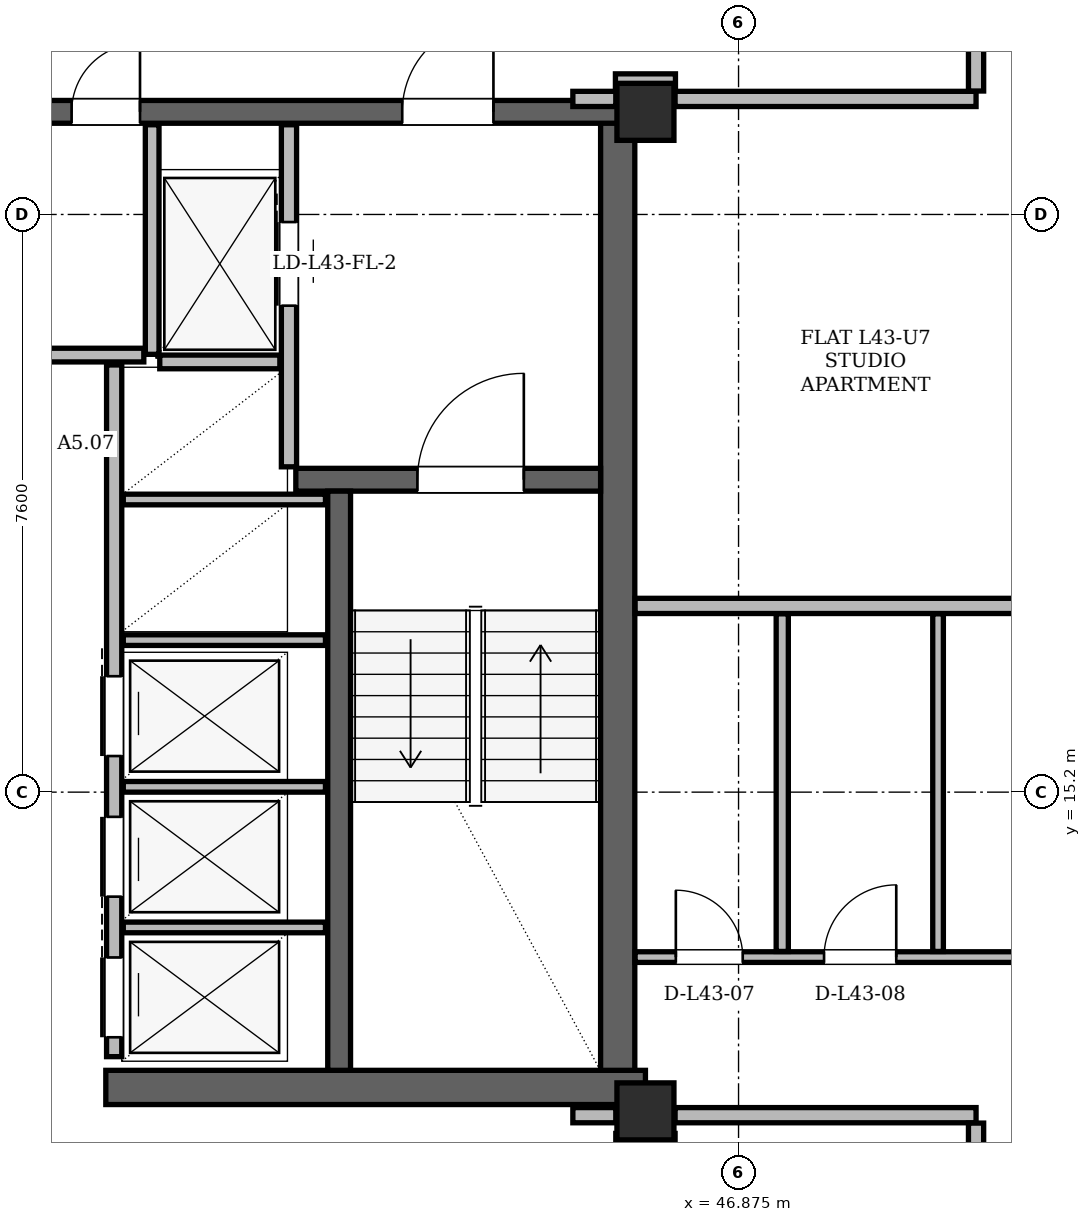
"""IFC4 building model, lengths in metres.
Left out: names, types, materials, properties, quantities, classifications, styles, units other than length and angle.
Written with IfcOpenShell. Run it as: python <this file> out.ifc"""

import sys

from ifc_helpers import new_model, si_unit, direction, frame, frame_2d, origin, origin_2d, place, context, subcontext, project, spatial, rectangle, hollow_rectangle, extrude, element, fill, save


model = new_model("IFC4")
c1 = context("Model", 3, precision=1e-05, world=origin(), true_north=direction((0.0, 1.0)))
c2 = subcontext(c1, "Body", "Model", "MODEL_VIEW")
j1 = project(units=[si_unit("LENGTHUNIT", "METRE"), si_unit("PLANEANGLEUNIT", "RADIAN")], contexts=[c1])
p1 = place(None, origin())
s1 = spatial("IfcSite", under=j1, at=p1, CompositionType="ELEMENT")
p2 = place(p1, origin())
s2 = spatial("IfcBuilding", under=s1, at=p2, CompositionType="ELEMENT")
p3 = place(p2, frame((0.0, 0.0, 163.8)))
s3 = spatial("IfcBuildingStorey", under=s2, at=p3, CompositionType="ELEMENT", Elevation=163.8)
for number, where, z_axis, x_axis in (
    (1, (45.65, 11.0, 0.0), (0.0, 0.0, 1.0), (1.0, 0.0, 0.0)),
    (2, (45.65, 24.15, 0.0), (0.0, 0.0, 1.0), (1.0, 0.0, 0.0)),
):
    element("IfcColumn", number, at=place(p3, frame(where, z_axis=z_axis, x_axis=x_axis)), inside=s3, PredefinedType="COLUMN", context=c2, shape_type="SweptSolid", body=[
        extrude(hollow_rectangle(XDim=0.75, YDim=0.75, WallThickness=0.06, at=origin_2d()), origin(), (0.0, 0.0, 1.0), 3.6),
    ])
p4 = place(p3, frame((45.285, 11.0, 0.0), z_axis=(0.0, 0.0, 1.0), x_axis=(0.0, 1.0, 0.0)))
e3 = element("IfcWall", 3, at=p4, inside=s3, PredefinedType="SHEAR", context=c2, shape_type="SweptSolid", body=[
    extrude(rectangle(XDim=13.3, YDim=0.45, at=frame_2d((6.65, 0.0))), origin(), (0.0, 0.0, 1.0), 3.38),
])
p5 = place(p3, frame((38.55, 11.315, 0.0), z_axis=(0.0, 0.0, 1.0), x_axis=(1.0, 0.0, 0.0)))
e4 = element("IfcWall", 4, at=p5, inside=s3, PredefinedType="SHEAR", context=c2, shape_type="SweptSolid", body=[
    extrude(rectangle(XDim=7.1, YDim=0.45, at=frame_2d((3.55, 0.0))), origin(), (0.0, 0.0, 1.0), 3.38),
])
p6 = place(p3, frame((29.65, 24.15, 0.0), z_axis=(0.0, 0.0, 1.0), x_axis=(1.0, 0.0, 0.0)))
e5 = element("IfcWall", 5, at=p6, inside=s3, PredefinedType="SHEAR", context=c2, shape_type="SweptSolid", body=[
    extrude(rectangle(XDim=15.7, YDim=0.3, at=frame_2d((7.85, 0.0))), origin(), (0.0, 0.0, 1.0), 3.38),
])
p7 = place(p6, frame((1.7, 0.0, 0.0)))
e6 = element("IfcOpeningElement", 6, at=p7, cuts=e5, PredefinedType="OPENING", context=c2, shape_type="SweptSolid", body=[
    extrude(rectangle(XDim=1.2, YDim=2.2, at=frame_2d((0.6, 1.1))), frame((0.0, 0.15, 0.0), z_axis=(0.0, -1.0, 0.0), x_axis=(1.0, 0.0, 0.0)), (0.0, 0.0, 1.0), 0.3),
])
p8 = place(p6, frame((12.8, 0.0, 0.0)))
e7 = element("IfcOpeningElement", 7, at=p8, cuts=e5, PredefinedType="OPENING", context=c2, shape_type="SweptSolid", body=[
    extrude(rectangle(XDim=1.2, YDim=2.2, at=frame_2d((0.6, 1.1))), frame((0.0, 0.15, 0.0), z_axis=(0.0, -1.0, 0.0), x_axis=(1.0, 0.0, 0.0)), (0.0, 0.0, 1.0), 0.3),
])
p9 = place(p6, frame((6.55, 0.0, 0.0)))
e8 = element("IfcOpeningElement", 8, at=p9, cuts=e5, PredefinedType="OPENING", context=c2, shape_type="SweptSolid", body=[
    extrude(rectangle(XDim=0.9, YDim=2.05, at=frame_2d((0.45, 1.025))), frame((0.0, 0.15, 0.0), z_axis=(0.0, -1.0, 0.0), x_axis=(1.0, 0.0, 0.0)), (0.0, 0.0, 1.0), 0.3),
])
p10 = place(p6, frame((8.45, 0.0, 0.0)))
e9 = element("IfcOpeningElement", 9, at=p10, cuts=e5, PredefinedType="OPENING", context=c2, shape_type="SweptSolid", body=[
    extrude(rectangle(XDim=0.9, YDim=2.05, at=frame_2d((0.45, 1.025))), frame((0.0, 0.15, 0.0), z_axis=(0.0, -1.0, 0.0), x_axis=(1.0, 0.0, 0.0)), (0.0, 0.0, 1.0), 0.3),
])
p11 = place(p3, frame((41.05, 19.31, 0.0), z_axis=(0.0, 0.0, 1.0), x_axis=(1.0, 0.0, 0.0)))
e10 = element("IfcWall", 10, at=p11, inside=s3, PredefinedType="SHEAR", context=c2, shape_type="SweptSolid", body=[
    extrude(rectangle(XDim=4.01, YDim=0.3, at=frame_2d((2.005, 0.0))), origin(), (0.0, 0.0, 1.0), 3.38),
])
p12 = place(p11, frame((1.6, 0.0, 0.0)))
e11 = element("IfcOpeningElement", 11, at=p12, cuts=e10, PredefinedType="OPENING", context=c2, shape_type="SweptSolid", body=[
    extrude(rectangle(XDim=1.4, YDim=2.2, at=frame_2d((0.7, 1.1))), frame((0.0, 0.15, 0.0), z_axis=(0.0, -1.0, 0.0), x_axis=(1.0, 0.0, 0.0)), (0.0, 0.0, 1.0), 0.3),
])
p13 = place(p3, frame((41.62, 11.54, 0.0), z_axis=(0.0, 0.0, 1.0), x_axis=(0.0, 1.0, 0.0)))
e12 = element("IfcWall", 12, at=p13, inside=s3, PredefinedType="SHEAR", context=c2, shape_type="SweptSolid", body=[
    extrude(rectangle(XDim=7.62, YDim=0.3, at=frame_2d((3.81, 0.0))), origin(), (0.0, 0.0, 1.0), 3.38),
])
p14 = place(p3, frame((59.804, 12.344, 0.0), z_axis=(0.0, 0.0, 1.0), x_axis=(-0.499998611639, 0.866026205354, 0.0)))
e13 = element("IfcWall", 13, at=p14, inside=s3, PredefinedType="SOLIDWALL", context=c2, shape_type="SweptSolid", body=[
    extrude(rectangle(XDim=35.738, YDim=0.34, at=frame_2d((17.869, 0.0))), origin(), (0.0, 0.0, 1.0), 2.6),
])
p15 = place(p14, frame((6.579, 0.0, 0.0)))
e14 = element("IfcOpeningElement", 14, at=p15, cuts=e13, PredefinedType="OPENING", context=c2, shape_type="SweptSolid", body=[
    extrude(rectangle(XDim=1.5, YDim=2.2, at=frame_2d((0.75, 1.1))), frame((0.0, 0.17, 0.0), z_axis=(0.0, -1.0, 0.0), x_axis=(1.0, 0.0, 0.0)), (0.0, 0.0, 1.0), 0.34),
])
p16 = place(p14, frame((26.303, 0.0, 0.0)))
e15 = element("IfcOpeningElement", 15, at=p16, cuts=e13, PredefinedType="OPENING", context=c2, shape_type="SweptSolid", body=[
    extrude(rectangle(XDim=1.3, YDim=2.2, at=frame_2d((0.65, 1.1))), frame((0.0, 0.17, 0.0), z_axis=(0.0, -1.0, 0.0), x_axis=(1.0, 0.0, 0.0)), (0.0, 0.0, 1.0), 0.34),
])
p17 = place(p14, frame((1.58, 0.0, 0.85)))
e16 = element("IfcOpeningElement", 16, at=p17, cuts=e13, PredefinedType="OPENING", context=c2, shape_type="SweptSolid", body=[
    extrude(rectangle(XDim=1.2, YDim=1.48, at=frame_2d((0.6, 0.74))), frame((0.0, 0.17, 0.0), z_axis=(0.0, -1.0, 0.0), x_axis=(1.0, 0.0, 0.0)), (0.0, 0.0, 1.0), 0.34),
])
p18 = place(p14, frame((16.77, 0.0, 0.85)))
e17 = element("IfcOpeningElement", 17, at=p18, cuts=e13, PredefinedType="OPENING", context=c2, shape_type="SweptSolid", body=[
    extrude(rectangle(XDim=3.0, YDim=1.64, at=frame_2d((1.5, 0.82))), frame((0.0, 0.17, 0.0), z_axis=(0.0, -1.0, 0.0), x_axis=(1.0, 0.0, 0.0)), (0.0, 0.0, 1.0), 0.34),
])
p19 = place(p14, frame((22.8, 0.0, 0.85)))
e18 = element("IfcOpeningElement", 18, at=p19, cuts=e13, PredefinedType="OPENING", context=c2, shape_type="SweptSolid", body=[
    extrude(rectangle(XDim=1.2, YDim=1.48, at=frame_2d((0.6, 0.74))), frame((0.0, 0.17, 0.0), z_axis=(0.0, -1.0, 0.0), x_axis=(1.0, 0.0, 0.0)), (0.0, 0.0, 1.0), 0.34),
])
p20 = place(p14, frame((13.242, 0.0, 0.85)))
e19 = element("IfcOpeningElement", 19, at=p20, cuts=e13, PredefinedType="OPENING", context=c2, shape_type="SweptSolid", body=[
    extrude(rectangle(XDim=1.2, YDim=1.48, at=frame_2d((0.6, 0.74))), frame((0.0, 0.17, 0.0), z_axis=(0.0, -1.0, 0.0), x_axis=(1.0, 0.0, 0.0)), (0.0, 0.0, 1.0), 0.34),
])
p21 = place(p14, frame((31.395, 0.0, 0.85)))
e20 = element("IfcOpeningElement", 20, at=p21, cuts=e13, PredefinedType="OPENING", context=c2, shape_type="SweptSolid", body=[
    extrude(rectangle(XDim=3.0, YDim=1.64, at=frame_2d((1.5, 0.82))), frame((0.0, 0.17, 0.0), z_axis=(0.0, -1.0, 0.0), x_axis=(1.0, 0.0, 0.0)), (0.0, 0.0, 1.0), 0.34),
])
p22 = place(p3, frame((40.96, 19.48, 0.0), z_axis=(0.0, 0.0, 1.0), x_axis=(0.0, 1.0, 0.0)))
e21 = element("IfcWall", 21, at=p22, inside=s3, PredefinedType="PARTITIONING", context=c2, shape_type="SweptSolid", body=[
    extrude(rectangle(XDim=4.5, YDim=0.2, at=frame_2d((2.25, 0.0))), origin(), (0.0, 0.0, 1.0), 2.42),
])
p23 = place(p22, frame((2.12, 0.0, 0.0)))
e22 = element("IfcOpeningElement", 22, at=p23, cuts=e21, PredefinedType="OPENING", context=c2, shape_type="SweptSolid", body=[
    extrude(rectangle(XDim=1.1, YDim=2.2, at=frame_2d((0.55, 1.1))), frame((0.0, 0.1, 0.0), z_axis=(0.0, -1.0, 0.0), x_axis=(1.0, 0.0, 0.0)), (0.0, 0.0, 1.0), 0.2),
])
p24 = place(p3, frame((39.16, 20.96, 0.0), z_axis=(0.0, 0.0, 1.0), x_axis=(0.0, 1.0, 0.0)))
e23 = element("IfcWall", 23, at=p24, inside=s3, PredefinedType="PARTITIONING", context=c2, shape_type="SweptSolid", body=[
    extrude(rectangle(XDim=3.02, YDim=0.18, at=frame_2d((1.51, 0.0))), origin(), (0.0, 0.0, 1.0), 2.42),
])
p25 = place(p3, frame((39.26, 20.86, 0.0), z_axis=(0.0, 0.0, 1.0), x_axis=(1.0, 0.0, 0.0)))
e24 = element("IfcWall", 24, at=p25, inside=s3, PredefinedType="PARTITIONING", context=c2, shape_type="SweptSolid", body=[
    extrude(rectangle(XDim=1.58, YDim=0.18, at=frame_2d((0.79, 0.0))), origin(), (0.0, 0.0, 1.0), 3.38),
])
p26 = place(p3, frame((38.66, 11.72, 0.0), z_axis=(0.0, 0.0, 1.0), x_axis=(0.0, 1.0, 0.0)))
e25 = element("IfcWall", 25, at=p26, inside=s3, PredefinedType="PARTITIONING", context=c2, shape_type="SweptSolid", body=[
    extrude(rectangle(XDim=9.1, YDim=0.2, at=frame_2d((4.55, 0.0))), origin(), (0.0, 0.0, 1.0), 3.38),
])
p27 = place(p26, frame((0.255, 0.0, 0.0)))
e26 = element("IfcOpeningElement", 26, at=p27, cuts=e25, PredefinedType="OPENING", context=c2, shape_type="SweptSolid", body=[
    extrude(rectangle(XDim=1.05, YDim=2.15, at=frame_2d((0.525, 1.075))), frame((0.0, 0.1, 0.0), z_axis=(0.0, -1.0, 0.0), x_axis=(1.0, 0.0, 0.0)), (0.0, 0.0, 1.0), 0.2),
])
p28 = place(p26, frame((2.105, 0.0, 0.0)))
e27 = element("IfcOpeningElement", 27, at=p28, cuts=e25, PredefinedType="OPENING", context=c2, shape_type="SweptSolid", body=[
    extrude(rectangle(XDim=1.05, YDim=2.15, at=frame_2d((0.525, 1.075))), frame((0.0, 0.1, 0.0), z_axis=(0.0, -1.0, 0.0), x_axis=(1.0, 0.0, 0.0)), (0.0, 0.0, 1.0), 0.2),
])
p29 = place(p26, frame((3.955, 0.0, 0.0)))
e28 = element("IfcOpeningElement", 28, at=p29, cuts=e25, PredefinedType="OPENING", context=c2, shape_type="SweptSolid", body=[
    extrude(rectangle(XDim=1.05, YDim=2.15, at=frame_2d((0.525, 1.075))), frame((0.0, 0.1, 0.0), z_axis=(0.0, -1.0, 0.0), x_axis=(1.0, 0.0, 0.0)), (0.0, 0.0, 1.0), 0.2),
])
for number, where, z_axis, x_axis in (
    (29, (38.78, 13.42, 0.0), (0.0, 0.0, 1.0), (1.0, 0.0, 0.0)),
    (30, (38.78, 15.27, 0.0), (0.0, 0.0, 1.0), (1.0, 0.0, 0.0)),
    (31, (38.78, 17.2, 0.0), (0.0, 0.0, 1.0), (1.0, 0.0, 0.0)),
    (32, (38.78, 19.05, 0.0), (0.0, 0.0, 1.0), (1.0, 0.0, 0.0)),
):
    element("IfcWall", number, at=place(p3, frame(where, z_axis=z_axis, x_axis=x_axis)), inside=s3, PredefinedType="PARTITIONING", context=c2, shape_type="SweptSolid", body=[
        extrude(rectangle(XDim=2.66, YDim=0.14, at=frame_2d((1.33, 0.0))), origin(), (0.0, 0.0, 1.0), 3.38),
    ])
p30 = place(p3, frame((35.95, 20.95, 0.0), z_axis=(0.0, 0.0, 1.0), x_axis=(1.0, 0.0, 0.0)))
e33 = element("IfcWall", 33, at=p30, inside=s3, PredefinedType="PARTITIONING", context=c2, shape_type="SweptSolid", body=[
    extrude(rectangle(XDim=3.1, YDim=0.18, at=frame_2d((1.55, 0.0))), origin(), (0.0, 0.0, 1.0), 3.38),
])
p31 = place(p3, frame((45.26, 10.61, 0.0), z_axis=(0.0, 0.0, 1.0), x_axis=(1.0, 0.0, 0.0)))
e34 = element("IfcWall", 34, at=p31, inside=s3, PredefinedType="PARTITIONING", context=c2, shape_type="SweptSolid", body=[
    extrude(rectangle(XDim=0.78, YDim=0.2, at=frame_2d((0.39, 0.0))), origin(), (0.0, 0.0, 1.0), 2.42),
])
p32 = place(p3, frame((44.695, 10.95, 0.0), z_axis=(0.0, 0.0, 1.0), x_axis=(1.0, 0.0, 0.0)))
e35 = element("IfcWall", 35, at=p32, inside=s3, PredefinedType="PARTITIONING", context=c2, shape_type="SweptSolid", body=[
    extrude(rectangle(XDim=0.565, YDim=0.2, at=frame_2d((0.282, 0.0))), origin(), (0.0, 0.0, 1.0), 2.42),
])
p33 = place(p3, frame((46.04, 10.95, 0.0), z_axis=(0.0, 0.0, 1.0), x_axis=(1.0, 0.0, 0.0)))
e36 = element("IfcWall", 36, at=p33, inside=s3, PredefinedType="PARTITIONING", context=c2, shape_type="SweptSolid", body=[
    extrude(rectangle(XDim=3.96, YDim=0.2, at=frame_2d((1.98, 0.0))), origin(), (0.0, 0.0, 1.0), 2.842),
])
p34 = place(p3, frame((45.514, 13.03, 0.0), z_axis=(0.0, 0.0, 1.0), x_axis=(1.0, 0.0, 0.0)))
e37 = element("IfcWall", 37, at=p34, inside=s3, PredefinedType="PARTITIONING", context=c2, shape_type="SweptSolid", body=[
    extrude(rectangle(XDim=13.693, YDim=0.14, at=frame_2d((6.847, 0.0))), origin(), (0.0, 0.0, 1.0), 2.42),
])
p35 = place(p34, frame((0.536, 0.0, 0.0)))
e38 = element("IfcOpeningElement", 38, at=p35, cuts=e37, PredefinedType="OPENING", context=c2, shape_type="SweptSolid", body=[
    extrude(rectangle(XDim=0.88, YDim=2.08, at=frame_2d((0.44, 1.04))), frame((0.0, 0.07, 0.0), z_axis=(0.0, -1.0, 0.0), x_axis=(1.0, 0.0, 0.0)), (0.0, 0.0, 1.0), 0.14),
])
p36 = place(p34, frame((2.486, 0.0, 0.0)))
e39 = element("IfcOpeningElement", 39, at=p36, cuts=e37, PredefinedType="OPENING", context=c2, shape_type="SweptSolid", body=[
    extrude(rectangle(XDim=0.95, YDim=2.1, at=frame_2d((0.475, 1.05))), frame((0.0, 0.07, 0.0), z_axis=(0.0, -1.0, 0.0), x_axis=(1.0, 0.0, 0.0)), (0.0, 0.0, 1.0), 0.14),
])
p37 = place(p34, frame((8.409, 0.0, 0.0)))
e40 = element("IfcOpeningElement", 40, at=p37, cuts=e37, PredefinedType="OPENING", context=c2, shape_type="SweptSolid", body=[
    extrude(rectangle(XDim=0.92, YDim=2.12, at=frame_2d((0.46, 1.06))), frame((0.0, 0.07, 0.0), z_axis=(0.0, -1.0, 0.0), x_axis=(1.0, 0.0, 0.0)), (0.0, 0.0, 1.0), 0.14),
])
p38 = place(p3, frame((45.514, 17.65, 0.0), z_axis=(0.0, 0.0, 1.0), x_axis=(1.0, 0.0, 0.0)))
e41 = element("IfcWall", 41, at=p38, inside=s3, PredefinedType="PARTITIONING", context=c2, shape_type="SweptSolid", body=[
    extrude(rectangle(XDim=11.026, YDim=0.2, at=frame_2d((5.513, 0.0))), origin(), (0.0, 0.0, 1.0), 2.42),
])
p39 = place(p3, frame((44.695, 24.32, 0.0), z_axis=(0.0, 0.0, 1.0), x_axis=(1.0, 0.0, 0.0)))
e42 = element("IfcWall", 42, at=p39, inside=s3, PredefinedType="PARTITIONING", context=c2, shape_type="SweptSolid", body=[
    extrude(rectangle(XDim=0.565, YDim=0.2, at=frame_2d((0.282, 0.0))), origin(), (0.0, 0.0, 1.0), 2.42),
])
p40 = place(p3, frame((46.04, 24.32, 0.0), z_axis=(0.0, 0.0, 1.0), x_axis=(1.0, 0.0, 0.0)))
e43 = element("IfcWall", 43, at=p40, inside=s3, PredefinedType="PARTITIONING", context=c2, shape_type="SweptSolid", body=[
    extrude(rectangle(XDim=3.96, YDim=0.2, at=frame_2d((1.98, 0.0))), origin(), (0.0, 0.0, 1.0), 3.38),
])
p41 = place(p3, frame((45.255, 24.55, 0.0), z_axis=(0.0, 0.0, 1.0), x_axis=(1.0, 0.0, 0.0)))
e44 = element("IfcWall", 44, at=p41, inside=s3, PredefinedType="PARTITIONING", context=c2, shape_type="SweptSolid", body=[
    extrude(rectangle(XDim=0.79, YDim=0.2, at=frame_2d((0.395, 0.0))), origin(), (0.0, 0.0, 1.0), 2.842),
])
p42 = place(p3, frame((47.45, 13.104, 0.0), z_axis=(0.0, 0.0, 1.0), x_axis=(0.0, 1.0, 0.0)))
e45 = element("IfcWall", 45, at=p42, inside=s3, PredefinedType="PARTITIONING", context=c2, shape_type="SweptSolid", body=[
    extrude(rectangle(XDim=4.442, YDim=0.16, at=frame_2d((2.221, 0.0))), origin(), (0.0, 0.0, 1.0), 3.38),
])
p43 = place(p3, frame((49.5, 13.104, 0.0), z_axis=(0.0, 0.0, 1.0), x_axis=(0.0, 1.0, 0.0)))
e46 = element("IfcWall", 46, at=p43, inside=s3, PredefinedType="PARTITIONING", context=c2, shape_type="SweptSolid", body=[
    extrude(rectangle(XDim=4.442, YDim=0.14, at=frame_2d((2.221, 0.0))), origin(), (0.0, 0.0, 1.0), 3.38),
])
for number, where, z_axis, x_axis in (
    (47, (50.0, 9.404, 0.0), (0.0, 0.0, 1.0), (0.0, 1.0, 0.0)),
    (48, (50.0, 24.424, 0.0), (0.0, 0.0, 1.0), (0.0, 1.0, 0.0)),
):
    element("IfcWall", number, at=place(p3, frame(where, z_axis=z_axis, x_axis=x_axis)), inside=s3, PredefinedType="PARTITIONING", context=c2, shape_type="SweptSolid", body=[
        extrude(rectangle(XDim=1.442, YDim=0.2, at=frame_2d((0.721, 0.0))), origin(), (0.0, 0.0, 1.0), 3.38),
    ])
p44 = place(p23, origin())
e49 = element("IfcDoor", 49, at=p44, inside=s3, OperationType="SLIDING_TO_RIGHT", PredefinedType="DOOR", context=c2, shape_type="SweptSolid", body=[
    extrude(rectangle(XDim=1.1, YDim=2.2, at=frame_2d((0.55, 1.1))), frame((0.0, 0.025, 0.0), z_axis=(0.0, -1.0, 0.0), x_axis=(1.0, 0.0, 0.0)), (0.0, 0.0, 1.0), 0.05),
])
fill(e22, e49)
p45 = place(p27, origin())
e50 = element("IfcDoor", 50, at=p45, inside=s3, OperationType="SLIDING_TO_RIGHT", PredefinedType="DOOR", context=c2, shape_type="SweptSolid", body=[
    extrude(rectangle(XDim=1.05, YDim=2.15, at=frame_2d((0.525, 1.075))), frame((0.0, 0.025, 0.0), z_axis=(0.0, -1.0, 0.0), x_axis=(1.0, 0.0, 0.0)), (0.0, 0.0, 1.0), 0.05),
])
fill(e26, e50)
p46 = place(p28, origin())
e51 = element("IfcDoor", 51, at=p46, inside=s3, OperationType="SLIDING_TO_LEFT", PredefinedType="DOOR", context=c2, shape_type="SweptSolid", body=[
    extrude(rectangle(XDim=1.05, YDim=2.15, at=frame_2d((0.525, 1.075))), frame((0.0, 0.025, 0.0), z_axis=(0.0, -1.0, 0.0), x_axis=(1.0, 0.0, 0.0)), (0.0, 0.0, 1.0), 0.05),
])
fill(e27, e51)
p47 = place(p29, origin())
e52 = element("IfcDoor", 52, at=p47, inside=s3, OperationType="SLIDING_TO_RIGHT", PredefinedType="DOOR", context=c2, shape_type="SweptSolid", body=[
    extrude(rectangle(XDim=1.05, YDim=2.15, at=frame_2d((0.525, 1.075))), frame((0.0, 0.025, 0.0), z_axis=(0.0, -1.0, 0.0), x_axis=(1.0, 0.0, 0.0)), (0.0, 0.0, 1.0), 0.05),
])
fill(e28, e52)
p48 = place(p12, origin())
e53 = element("IfcDoor", 53, at=p48, inside=s3, OperationType="SINGLE_SWING_RIGHT", PredefinedType="DOOR", context=c2, shape_type="SweptSolid", body=[
    extrude(rectangle(XDim=1.4, YDim=2.2, at=frame_2d((0.7, 1.1))), frame((0.0, 0.025, 0.0), z_axis=(0.0, -1.0, 0.0), x_axis=(1.0, 0.0, 0.0)), (0.0, 0.0, 1.0), 0.05),
])
fill(e11, e53)
p49 = place(p8, origin())
e54 = element("IfcDoor", 54, at=p49, inside=s3, OperationType="SINGLE_SWING_RIGHT", PredefinedType="DOOR", context=c2, shape_type="SweptSolid", body=[
    extrude(rectangle(XDim=1.2, YDim=2.2, at=frame_2d((0.6, 1.1))), frame((0.0, 0.025, 0.0), z_axis=(0.0, -1.0, 0.0), x_axis=(1.0, 0.0, 0.0)), (0.0, 0.0, 1.0), 0.05),
])
fill(e7, e54)
p50 = place(p10, origin())
e55 = element("IfcDoor", 55, at=p50, inside=s3, OperationType="SINGLE_SWING_RIGHT", PredefinedType="DOOR", context=c2, shape_type="SweptSolid", body=[
    extrude(rectangle(XDim=0.9, YDim=2.05, at=frame_2d((0.45, 1.025))), frame((0.0, 0.025, 0.0), z_axis=(0.0, -1.0, 0.0), x_axis=(1.0, 0.0, 0.0)), (0.0, 0.0, 1.0), 0.05),
])
fill(e9, e55)
p51 = place(p35, origin())
e56 = element("IfcDoor", 56, at=p51, inside=s3, OperationType="SINGLE_SWING_LEFT", PredefinedType="DOOR", context=c2, shape_type="SweptSolid", body=[
    extrude(rectangle(XDim=0.88, YDim=2.08, at=frame_2d((0.44, 1.04))), frame((0.0, 0.025, 0.0), z_axis=(0.0, -1.0, 0.0), x_axis=(1.0, 0.0, 0.0)), (0.0, 0.0, 1.0), 0.05),
])
fill(e38, e56)
p52 = place(p36, origin())
e57 = element("IfcDoor", 57, at=p52, inside=s3, OperationType="SINGLE_SWING_RIGHT", PredefinedType="DOOR", context=c2, shape_type="SweptSolid", body=[
    extrude(rectangle(XDim=0.95, YDim=2.1, at=frame_2d((0.475, 1.05))), frame((0.0, 0.025, 0.0), z_axis=(0.0, -1.0, 0.0), x_axis=(1.0, 0.0, 0.0)), (0.0, 0.0, 1.0), 0.05),
])
fill(e39, e57)
save(model, sys.argv[1])
